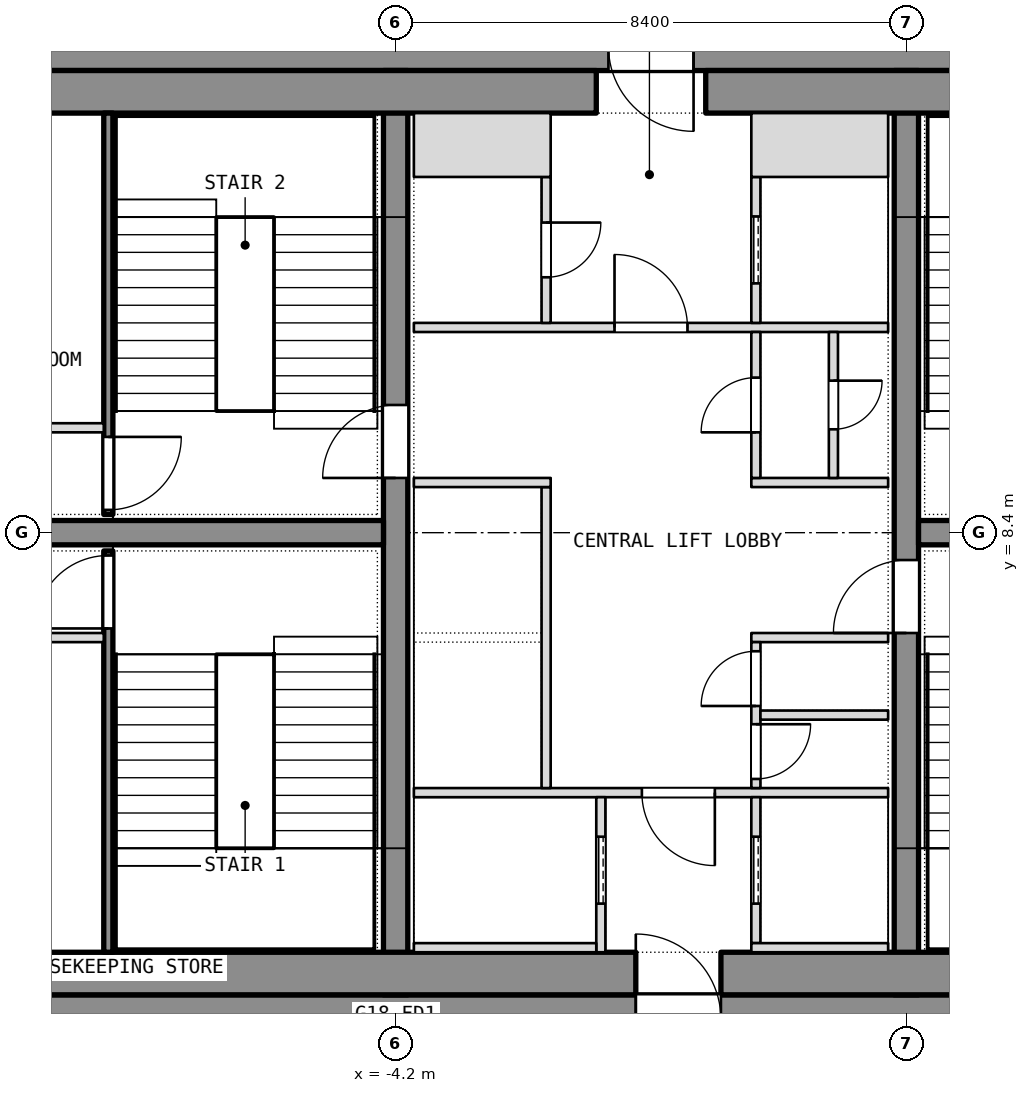
"""IFC4 building model, lengths in metres.
Left out: names, types, materials, properties, quantities, classifications, styles, units other than length and angle.
Written with IfcOpenShell. Run it as: python <this file> out.ifc"""

import sys

from ifc_helpers import new_model, si_unit, direction, frame, frame_2d, origin, place, context, subcontext, project, spatial, rectangle, extrude, element, fill, save


model = new_model("IFC4")
c1 = context("Model", 3, precision=1e-05, world=origin(), true_north=direction((0.0, 1.0)))
c2 = subcontext(c1, "Body", "Model", "MODEL_VIEW")
j1 = project(units=[si_unit("LENGTHUNIT", "METRE"), si_unit("PLANEANGLEUNIT", "RADIAN")], contexts=[c1])
p1 = place(None, origin())
s1 = spatial("IfcSite", under=j1, at=p1, CompositionType="ELEMENT")
p2 = place(p1, origin())
s2 = spatial("IfcBuilding", under=s1, at=p2, CompositionType="ELEMENT")
p3 = place(p2, frame((0.0, 0.0, 216.5)))
s3 = spatial("IfcBuildingStorey", under=s2, at=p3, CompositionType="ELEMENT", Elevation=216.5)
p4 = place(p3, frame((-11.1, 0.4, 0.0), z_axis=(0.0, 0.0, 1.0), x_axis=(1.0, 0.0, 0.0)))
e1 = element("IfcWall", 1, at=p4, inside=s3, PredefinedType="SHEAR", context=c2, shape_type="SweptSolid", body=[
    extrude(rectangle(XDim=22.2, YDim=0.8, at=frame_2d((11.1, 0.0))), origin(), (0.0, 0.0, 1.0), 3.6),
])
p5 = place(p4, frame((10.85, 0.0, 0.0)))
e2 = element("IfcOpeningElement", 2, at=p5, cuts=e1, PredefinedType="OPENING", context=c2, shape_type="SweptSolid", body=[
    extrude(rectangle(XDim=1.4, YDim=2.1, at=frame_2d((0.7, 1.05))), frame((0.0, 0.4, 0.0), z_axis=(0.0, -1.0, 0.0), x_axis=(1.0, 0.0, 0.0)), (0.0, 0.0, 1.0), 0.8),
])
p6 = place(p3, frame((-11.1, 16.4, 0.0), z_axis=(0.0, 0.0, 1.0), x_axis=(1.0, 0.0, 0.0)))
e3 = element("IfcWall", 3, at=p6, inside=s3, PredefinedType="SHEAR", context=c2, shape_type="SweptSolid", body=[
    extrude(rectangle(XDim=22.2, YDim=0.8, at=frame_2d((11.1, 0.0))), origin(), (0.0, 0.0, 1.0), 3.6),
])
p7 = place(p6, frame((10.4, 0.0, 0.0)))
e4 = element("IfcOpeningElement", 4, at=p7, cuts=e3, PredefinedType="OPENING", context=c2, shape_type="SweptSolid", body=[
    extrude(rectangle(XDim=1.4, YDim=2.1, at=frame_2d((0.7, 1.05))), frame((0.0, 0.4, 0.0), z_axis=(0.0, -1.0, 0.0), x_axis=(1.0, 0.0, 0.0)), (0.0, 0.0, 1.0), 0.8),
])
p8 = place(p3, frame((-4.2, 0.8, 0.0), z_axis=(0.0, 0.0, 1.0), x_axis=(0.0, 1.0, 0.0)))
e5 = element("IfcWall", 5, at=p8, inside=s3, PredefinedType="SHEAR", context=c2, shape_type="SweptSolid", body=[
    extrude(rectangle(XDim=15.2, YDim=0.4, at=frame_2d((7.6, 0.0))), origin(), (0.0, 0.0, 1.0), 3.6),
])
p9 = place(p8, frame((8.5, 0.0, 0.0)))
e6 = element("IfcOpeningElement", 6, at=p9, cuts=e5, PredefinedType="OPENING", context=c2, shape_type="SweptSolid", body=[
    extrude(rectangle(XDim=1.2, YDim=2.1, at=frame_2d((0.6, 1.05))), frame((0.0, 0.2, 0.0), z_axis=(0.0, -1.0, 0.0), x_axis=(1.0, 0.0, 0.0)), (0.0, 0.0, 1.0), 0.4),
])
p10 = place(p3, frame((4.2, 0.8, 0.0), z_axis=(0.0, 0.0, 1.0), x_axis=(0.0, 1.0, 0.0)))
e7 = element("IfcWall", 7, at=p10, inside=s3, PredefinedType="SHEAR", context=c2, shape_type="SweptSolid", body=[
    extrude(rectangle(XDim=15.2, YDim=0.4, at=frame_2d((7.6, 0.0))), origin(), (0.0, 0.0, 1.0), 3.6),
])
p11 = place(p10, frame((5.95, 0.0, 0.0)))
e8 = element("IfcOpeningElement", 8, at=p11, cuts=e7, PredefinedType="OPENING", context=c2, shape_type="SweptSolid", body=[
    extrude(rectangle(XDim=1.2, YDim=2.1, at=frame_2d((0.6, 1.05))), frame((0.0, 0.2, 0.0), z_axis=(0.0, -1.0, 0.0), x_axis=(1.0, 0.0, 0.0)), (0.0, 0.0, 1.0), 0.4),
])
for number, where, z_axis, x_axis in (
    (9, (-11.1, 8.4, 0.0), (0.0, 0.0, 1.0), (1.0, 0.0, 0.0)),
    (10, (4.4, 8.4, 0.0), (0.0, 0.0, 1.0), (1.0, 0.0, 0.0)),
):
    element("IfcWall", number, at=place(p3, frame(where, z_axis=z_axis, x_axis=x_axis)), inside=s3, PredefinedType="SHEAR", context=c2, shape_type="SweptSolid", body=[
        extrude(rectangle(XDim=6.7, YDim=0.4, at=frame_2d((3.35, 0.0))), origin(), (0.0, 0.0, 1.0), 3.6),
    ])
p12 = place(p3, frame((-11.1, 1.15, 0.0), z_axis=(0.0, 0.0, 1.0), x_axis=(1.0, 0.0, 0.0)))
e11 = element("IfcWall", 11, at=p12, inside=s3, PredefinedType="PARTITIONING", context=c2, shape_type="SweptSolid", body=[
    extrude(rectangle(XDim=10.85, YDim=0.7, at=frame_2d((5.425, 0.0))), origin(), (0.0, 0.0, 1.0), 3.34),
])
p13 = place(p3, frame((1.15, 1.15, 0.0), z_axis=(0.0, 0.0, 1.0), x_axis=(1.0, 0.0, 0.0)))
e12 = element("IfcWall", 12, at=p13, inside=s3, PredefinedType="PARTITIONING", context=c2, shape_type="SweptSolid", body=[
    extrude(rectangle(XDim=9.95, YDim=0.7, at=frame_2d((4.975, 0.0))), origin(), (0.0, 0.0, 1.0), 3.34),
])
for number, where, z_axis, x_axis in (
    (13, (-11.1, 15.65, 0.0), (0.0, 0.0, 1.0), (1.0, 0.0, 0.0)),
    (14, (0.9, 15.65, 0.0), (0.0, 0.0, 1.0), (1.0, 0.0, 0.0)),
):
    element("IfcWall", number, at=place(p3, frame(where, z_axis=z_axis, x_axis=x_axis)), inside=s3, PredefinedType="PARTITIONING", context=c2, shape_type="SweptSolid", body=[
        extrude(rectangle(XDim=10.2, YDim=0.7, at=frame_2d((5.1, 0.0))), origin(), (0.0, 0.0, 1.0), 3.34),
    ])
p14 = place(p3, frame((-8.925, 1.5, 0.0), z_axis=(0.0, 0.0, 1.0), x_axis=(0.0, 1.0, 0.0)))
e15 = element("IfcWall", 15, at=p14, inside=s3, PredefinedType="SHEAR", context=c2, shape_type="SweptSolid", body=[
    extrude(rectangle(XDim=6.6, YDim=0.15, at=frame_2d((3.3, 0.0))), origin(), (0.0, 0.0, 1.0), 3.34),
])
p15 = place(p14, frame((5.325, 0.0, 0.0)))
e16 = element("IfcOpeningElement", 16, at=p15, cuts=e15, PredefinedType="OPENING", context=c2, shape_type="SweptSolid", body=[
    extrude(rectangle(XDim=1.2, YDim=2.1, at=frame_2d((0.6, 1.05))), frame((0.0, 0.075, 0.0), z_axis=(0.0, -1.0, 0.0), x_axis=(1.0, 0.0, 0.0)), (0.0, 0.0, 1.0), 0.15),
])
p16 = place(p3, frame((-11.1, 6.675, 0.0), z_axis=(0.0, 0.0, 1.0), x_axis=(1.0, 0.0, 0.0)))
e17 = element("IfcWall", 17, at=p16, inside=s3, PredefinedType="PARTITIONING", context=c2, shape_type="SweptSolid", body=[
    extrude(rectangle(XDim=2.1, YDim=0.15, at=frame_2d((1.05, 0.0))), origin(), (0.0, 0.0, 1.0), 3.34),
])
p17 = place(p3, frame((-8.925, 8.7, 0.0), z_axis=(0.0, 0.0, 1.0), x_axis=(0.0, 1.0, 0.0)))
e18 = element("IfcWall", 18, at=p17, inside=s3, PredefinedType="SHEAR", context=c2, shape_type="SweptSolid", body=[
    extrude(rectangle(XDim=6.6, YDim=0.15, at=frame_2d((3.3, 0.0))), origin(), (0.0, 0.0, 1.0), 3.34),
])
p18 = place(p17, frame((0.075, 0.0, 0.0)))
e19 = element("IfcOpeningElement", 19, at=p18, cuts=e18, PredefinedType="OPENING", context=c2, shape_type="SweptSolid", body=[
    extrude(rectangle(XDim=1.2, YDim=2.1, at=frame_2d((0.6, 1.05))), frame((0.0, 0.075, 0.0), z_axis=(0.0, -1.0, 0.0), x_axis=(1.0, 0.0, 0.0)), (0.0, 0.0, 1.0), 0.15),
])
p19 = place(p3, frame((-11.1, 10.125, 0.0), z_axis=(0.0, 0.0, 1.0), x_axis=(1.0, 0.0, 0.0)))
e20 = element("IfcWall", 20, at=p19, inside=s3, PredefinedType="PARTITIONING", context=c2, shape_type="SweptSolid", body=[
    extrude(rectangle(XDim=2.1, YDim=0.15, at=frame_2d((1.05, 0.0))), origin(), (0.0, 0.0, 1.0), 3.34),
])
p20 = place(p3, frame((-3.9, 4.125, 0.0), z_axis=(0.0, 0.0, 1.0), x_axis=(1.0, 0.0, 0.0)))
e21 = element("IfcWall", 21, at=p20, inside=s3, PredefinedType="PARTITIONING", context=c2, shape_type="SweptSolid", body=[
    extrude(rectangle(XDim=7.8, YDim=0.15, at=frame_2d((3.9, 0.0))), origin(), (0.0, 0.0, 1.0), 3.34),
])
p21 = place(p20, frame((3.75, 0.0, 0.0)))
e22 = element("IfcOpeningElement", 22, at=p21, cuts=e21, PredefinedType="OPENING", context=c2, shape_type="SweptSolid", body=[
    extrude(rectangle(XDim=1.2, YDim=2.1, at=frame_2d((0.6, 1.05))), frame((0.0, 0.075, 0.0), z_axis=(0.0, -1.0, 0.0), x_axis=(1.0, 0.0, 0.0)), (0.0, 0.0, 1.0), 0.15),
])
p22 = place(p3, frame((-3.9, 11.775, 0.0), z_axis=(0.0, 0.0, 1.0), x_axis=(1.0, 0.0, 0.0)))
e23 = element("IfcWall", 23, at=p22, inside=s3, PredefinedType="PARTITIONING", context=c2, shape_type="SweptSolid", body=[
    extrude(rectangle(XDim=7.8, YDim=0.15, at=frame_2d((3.9, 0.0))), origin(), (0.0, 0.0, 1.0), 3.34),
])
p23 = place(p22, frame((3.3, 0.0, 0.0)))
e24 = element("IfcOpeningElement", 24, at=p23, cuts=e23, PredefinedType="OPENING", context=c2, shape_type="SweptSolid", body=[
    extrude(rectangle(XDim=1.2, YDim=2.1, at=frame_2d((0.6, 1.05))), frame((0.0, 0.075, 0.0), z_axis=(0.0, -1.0, 0.0), x_axis=(1.0, 0.0, 0.0)), (0.0, 0.0, 1.0), 0.15),
])
p24 = place(p3, frame((-0.825, 1.5, 0.0), z_axis=(0.0, 0.0, 1.0), x_axis=(0.0, 1.0, 0.0)))
e25 = element("IfcWall", 25, at=p24, inside=s3, PredefinedType="SHEAR", context=c2, shape_type="SweptSolid", body=[
    extrude(rectangle(XDim=2.55, YDim=0.15, at=frame_2d((1.275, 0.0))), origin(), (0.0, 0.0, 1.0), 3.6),
])
p25 = place(p24, frame((0.8, 0.0, 0.0)))
e26 = element("IfcOpeningElement", 26, at=p25, cuts=e25, PredefinedType="OPENING", context=c2, shape_type="SweptSolid", body=[
    extrude(rectangle(XDim=1.1, YDim=2.1, at=frame_2d((0.55, 1.05))), frame((0.0, 0.075, 0.0), z_axis=(0.0, -1.0, 0.0), x_axis=(1.0, 0.0, 0.0)), (0.0, 0.0, 1.0), 0.15),
])
p26 = place(p3, frame((-3.9, 1.575, 0.0), z_axis=(0.0, 0.0, 1.0), x_axis=(1.0, 0.0, 0.0)))
e27 = element("IfcWall", 27, at=p26, inside=s3, PredefinedType="SHEAR", context=c2, shape_type="SweptSolid", body=[
    extrude(rectangle(XDim=3.0, YDim=0.15, at=frame_2d((1.5, 0.0))), origin(), (0.0, 0.0, 1.0), 3.6),
])
p27 = place(p3, frame((-1.725, 4.2, 0.0), z_axis=(0.0, 0.0, 1.0), x_axis=(0.0, 1.0, 0.0)))
e28 = element("IfcWall", 28, at=p27, inside=s3, PredefinedType="SHEAR", context=c2, shape_type="SweptSolid", body=[
    extrude(rectangle(XDim=4.95, YDim=0.15, at=frame_2d((2.475, 0.0))), origin(), (0.0, 0.0, 1.0), 3.6),
])
p28 = place(p3, frame((-3.9, 9.225, 0.0), z_axis=(0.0, 0.0, 1.0), x_axis=(1.0, 0.0, 0.0)))
e29 = element("IfcWall", 29, at=p28, inside=s3, PredefinedType="SHEAR", context=c2, shape_type="SweptSolid", body=[
    extrude(rectangle(XDim=2.25, YDim=0.15, at=frame_2d((1.125, 0.0))), origin(), (0.0, 0.0, 1.0), 3.6),
])
p29 = place(p3, frame((-1.725, 11.85, 0.0), z_axis=(0.0, 0.0, 1.0), x_axis=(0.0, 1.0, 0.0)))
e30 = element("IfcWall", 30, at=p29, inside=s3, PredefinedType="PARTITIONING", context=c2, shape_type="SweptSolid", body=[
    extrude(rectangle(XDim=2.4, YDim=0.15, at=frame_2d((1.2, 0.0))), origin(), (0.0, 0.0, 1.0), 3.34),
])
p30 = place(p29, frame((0.75, 0.0, 0.0)))
e31 = element("IfcOpeningElement", 31, at=p30, cuts=e30, PredefinedType="OPENING", context=c2, shape_type="SweptSolid", body=[
    extrude(rectangle(XDim=0.9, YDim=2.1, at=frame_2d((0.45, 1.05))), frame((0.0, 0.075, 0.0), z_axis=(0.0, -1.0, 0.0), x_axis=(1.0, 0.0, 0.0)), (0.0, 0.0, 1.0), 0.15),
])
p31 = place(p3, frame((-3.9, 14.775, 0.0), z_axis=(0.0, 0.0, 1.0), x_axis=(1.0, 0.0, 0.0)))
e32 = element("IfcWall", 32, at=p31, inside=s3, PredefinedType="PARTITIONING", context=c2, shape_type="SweptSolid", body=[
    extrude(rectangle(XDim=2.25, YDim=1.05, at=frame_2d((1.125, 0.0))), origin(), (0.0, 0.0, 1.0), 3.34),
])
p32 = place(p3, frame((1.725, 1.65, 0.0), z_axis=(0.0, 0.0, 1.0), x_axis=(0.0, 1.0, 0.0)))
e33 = element("IfcWall", 33, at=p32, inside=s3, PredefinedType="SHEAR", context=c2, shape_type="SweptSolid", body=[
    extrude(rectangle(XDim=2.4, YDim=0.15, at=frame_2d((1.2, 0.0))), origin(), (0.0, 0.0, 1.0), 3.6),
])
p33 = place(p32, frame((0.65, 0.0, 0.0)))
e34 = element("IfcOpeningElement", 34, at=p33, cuts=e33, PredefinedType="OPENING", context=c2, shape_type="SweptSolid", body=[
    extrude(rectangle(XDim=1.1, YDim=2.1, at=frame_2d((0.55, 1.05))), frame((0.0, 0.075, 0.0), z_axis=(0.0, -1.0, 0.0), x_axis=(1.0, 0.0, 0.0)), (0.0, 0.0, 1.0), 0.15),
])
p34 = place(p3, frame((1.65, 1.575, 0.0), z_axis=(0.0, 0.0, 1.0), x_axis=(1.0, 0.0, 0.0)))
e35 = element("IfcWall", 35, at=p34, inside=s3, PredefinedType="SHEAR", context=c2, shape_type="SweptSolid", body=[
    extrude(rectangle(XDim=2.25, YDim=0.15, at=frame_2d((1.125, 0.0))), origin(), (0.0, 0.0, 1.0), 3.6),
])
p35 = place(p3, frame((1.725, 11.85, 0.0), z_axis=(0.0, 0.0, 1.0), x_axis=(0.0, 1.0, 0.0)))
e36 = element("IfcWall", 36, at=p35, inside=s3, PredefinedType="SHEAR", context=c2, shape_type="SweptSolid", body=[
    extrude(rectangle(XDim=2.4, YDim=0.15, at=frame_2d((1.2, 0.0))), origin(), (0.0, 0.0, 1.0), 3.6),
])
p36 = place(p35, frame((0.65, 0.0, 0.0)))
e37 = element("IfcOpeningElement", 37, at=p36, cuts=e36, PredefinedType="OPENING", context=c2, shape_type="SweptSolid", body=[
    extrude(rectangle(XDim=1.1, YDim=2.1, at=frame_2d((0.55, 1.05))), frame((0.0, 0.075, 0.0), z_axis=(0.0, -1.0, 0.0), x_axis=(1.0, 0.0, 0.0)), (0.0, 0.0, 1.0), 0.15),
])
p37 = place(p3, frame((1.65, 14.775, 0.0), z_axis=(0.0, 0.0, 1.0), x_axis=(1.0, 0.0, 0.0)))
e38 = element("IfcWall", 38, at=p37, inside=s3, PredefinedType="SHEAR", context=c2, shape_type="SweptSolid", body=[
    extrude(rectangle(XDim=2.25, YDim=1.05, at=frame_2d((1.125, 0.0))), origin(), (0.0, 0.0, 1.0), 3.6),
])
for number, where, z_axis, x_axis in (
    (39, (1.65, 6.675, 0.0), (0.0, 0.0, 1.0), (1.0, 0.0, 0.0)),
    (40, (1.65, 9.225, 0.0), (0.0, 0.0, 1.0), (1.0, 0.0, 0.0)),
):
    element("IfcWall", number, at=place(p3, frame(where, z_axis=z_axis, x_axis=x_axis)), inside=s3, PredefinedType="PARTITIONING", context=c2, shape_type="SweptSolid", body=[
        extrude(rectangle(XDim=2.25, YDim=0.15, at=frame_2d((1.125, 0.0))), origin(), (0.0, 0.0, 1.0), 3.34),
    ])
p38 = place(p3, frame((1.725, 4.2, 0.0), z_axis=(0.0, 0.0, 1.0), x_axis=(0.0, 1.0, 0.0)))
e41 = element("IfcWall", 41, at=p38, inside=s3, PredefinedType="PARTITIONING", context=c2, shape_type="SweptSolid", body=[
    extrude(rectangle(XDim=2.4, YDim=0.15, at=frame_2d((1.2, 0.0))), origin(), (0.0, 0.0, 1.0), 3.34),
])
p39 = place(p38, frame((0.15, 0.0, 0.0)))
e42 = element("IfcOpeningElement", 42, at=p39, cuts=e41, PredefinedType="OPENING", context=c2, shape_type="SweptSolid", body=[
    extrude(rectangle(XDim=0.9, YDim=2.1, at=frame_2d((0.45, 1.05))), frame((0.0, 0.075, 0.0), z_axis=(0.0, -1.0, 0.0), x_axis=(1.0, 0.0, 0.0)), (0.0, 0.0, 1.0), 0.15),
])
p40 = place(p38, frame((1.35, 0.0, 0.0)))
e43 = element("IfcOpeningElement", 43, at=p40, cuts=e41, PredefinedType="OPENING", context=c2, shape_type="SweptSolid", body=[
    extrude(rectangle(XDim=0.9, YDim=2.1, at=frame_2d((0.45, 1.05))), frame((0.0, 0.075, 0.0), z_axis=(0.0, -1.0, 0.0), x_axis=(1.0, 0.0, 0.0)), (0.0, 0.0, 1.0), 0.15),
])
p41 = place(p3, frame((1.725, 9.3, 0.0), z_axis=(0.0, 0.0, 1.0), x_axis=(0.0, 1.0, 0.0)))
e44 = element("IfcWall", 44, at=p41, inside=s3, PredefinedType="PARTITIONING", context=c2, shape_type="SweptSolid", body=[
    extrude(rectangle(XDim=2.4, YDim=0.15, at=frame_2d((1.2, 0.0))), origin(), (0.0, 0.0, 1.0), 3.34),
])
p42 = place(p41, frame((0.75, 0.0, 0.0)))
e45 = element("IfcOpeningElement", 45, at=p42, cuts=e44, PredefinedType="OPENING", context=c2, shape_type="SweptSolid", body=[
    extrude(rectangle(XDim=0.9, YDim=2.1, at=frame_2d((0.45, 1.05))), frame((0.0, 0.075, 0.0), z_axis=(0.0, -1.0, 0.0), x_axis=(1.0, 0.0, 0.0)), (0.0, 0.0, 1.0), 0.15),
])
p43 = place(p3, frame((1.8, 5.4, 0.0), z_axis=(0.0, 0.0, 1.0), x_axis=(1.0, 0.0, 0.0)))
e46 = element("IfcWall", 46, at=p43, inside=s3, PredefinedType="PARTITIONING", context=c2, shape_type="SweptSolid", body=[
    extrude(rectangle(XDim=2.1, YDim=0.15, at=frame_2d((1.05, 0.0))), origin(), (0.0, 0.0, 1.0), 3.34),
])
p44 = place(p3, frame((3.0, 9.3, 0.0), z_axis=(0.0, 0.0, 1.0), x_axis=(0.0, 1.0, 0.0)))
e47 = element("IfcWall", 47, at=p44, inside=s3, PredefinedType="PARTITIONING", context=c2, shape_type="SweptSolid", body=[
    extrude(rectangle(XDim=2.4, YDim=0.15, at=frame_2d((1.2, 0.0))), origin(), (0.0, 0.0, 1.0), 3.34),
])
p45 = place(p44, frame((0.8, 0.0, 0.0)))
e48 = element("IfcOpeningElement", 48, at=p45, cuts=e47, PredefinedType="OPENING", context=c2, shape_type="SweptSolid", body=[
    extrude(rectangle(XDim=0.8, YDim=2.1, at=frame_2d((0.4, 1.05))), frame((0.0, 0.075, 0.0), z_axis=(0.0, -1.0, 0.0), x_axis=(1.0, 0.0, 0.0)), (0.0, 0.0, 1.0), 0.15),
])
p46 = place(p15, origin())
e49 = element("IfcDoor", 49, at=p46, inside=s3, OperationType="SINGLE_SWING_LEFT", PredefinedType="DOOR", context=c2, shape_type="SweptSolid", body=[
    extrude(rectangle(XDim=1.2, YDim=2.1, at=frame_2d((0.6, 1.05))), frame((0.0, 0.025, 0.0), z_axis=(0.0, -1.0, 0.0), x_axis=(1.0, 0.0, 0.0)), (0.0, 0.0, 1.0), 0.05),
])
fill(e16, e49)
p47 = place(p18, origin())
e50 = element("IfcDoor", 50, at=p47, inside=s3, OperationType="SINGLE_SWING_LEFT", PredefinedType="DOOR", context=c2, shape_type="SweptSolid", body=[
    extrude(rectangle(XDim=1.2, YDim=2.1, at=frame_2d((0.6, 1.05))), frame((0.0, 0.025, 0.0), z_axis=(0.0, -1.0, 0.0), x_axis=(1.0, 0.0, 0.0)), (0.0, 0.0, 1.0), 0.05),
])
fill(e19, e50)
p48 = place(p39, origin())
e51 = element("IfcDoor", 51, at=p48, inside=s3, OperationType="SINGLE_SWING_LEFT", PredefinedType="DOOR", context=c2, shape_type="SweptSolid", body=[
    extrude(rectangle(XDim=0.9, YDim=2.1, at=frame_2d((0.45, 1.05))), frame((0.0, 0.025, 0.0), z_axis=(0.0, -1.0, 0.0), x_axis=(1.0, 0.0, 0.0)), (0.0, 0.0, 1.0), 0.05),
])
fill(e42, e51)
p49 = place(p40, origin())
e52 = element("IfcDoor", 52, at=p49, inside=s3, OperationType="SINGLE_SWING_LEFT", PredefinedType="DOOR", context=c2, shape_type="SweptSolid", body=[
    extrude(rectangle(XDim=0.9, YDim=2.1, at=frame_2d((0.45, 1.05))), frame((0.0, 0.025, 0.0), z_axis=(0.0, -1.0, 0.0), x_axis=(1.0, 0.0, 0.0)), (0.0, 0.0, 1.0), 0.05),
])
fill(e43, e52)
p50 = place(p42, origin())
e53 = element("IfcDoor", 53, at=p50, inside=s3, OperationType="SINGLE_SWING_LEFT", PredefinedType="DOOR", context=c2, shape_type="SweptSolid", body=[
    extrude(rectangle(XDim=0.9, YDim=2.1, at=frame_2d((0.45, 1.05))), frame((0.0, 0.025, 0.0), z_axis=(0.0, -1.0, 0.0), x_axis=(1.0, 0.0, 0.0)), (0.0, 0.0, 1.0), 0.05),
])
fill(e45, e53)
p51 = place(p45, origin())
e54 = element("IfcDoor", 54, at=p51, inside=s3, OperationType="SINGLE_SWING_LEFT", PredefinedType="DOOR", context=c2, shape_type="SweptSolid", body=[
    extrude(rectangle(XDim=0.8, YDim=2.1, at=frame_2d((0.4, 1.05))), frame((0.0, 0.025, 0.0), z_axis=(0.0, -1.0, 0.0), x_axis=(1.0, 0.0, 0.0)), (0.0, 0.0, 1.0), 0.05),
])
fill(e48, e54)
p52 = place(p25, origin())
e55 = element("IfcDoor", 55, at=p52, inside=s3, OperationType="SLIDING_TO_LEFT", PredefinedType="DOOR", context=c2, shape_type="SweptSolid", body=[
    extrude(rectangle(XDim=1.1, YDim=2.1, at=frame_2d((0.55, 1.05))), frame((0.0, 0.025, 0.0), z_axis=(0.0, -1.0, 0.0), x_axis=(1.0, 0.0, 0.0)), (0.0, 0.0, 1.0), 0.05),
])
fill(e26, e55)
p53 = place(p33, origin())
e56 = element("IfcDoor", 56, at=p53, inside=s3, OperationType="SLIDING_TO_LEFT", PredefinedType="DOOR", context=c2, shape_type="SweptSolid", body=[
    extrude(rectangle(XDim=1.1, YDim=2.1, at=frame_2d((0.55, 1.05))), frame((0.0, 0.025, 0.0), z_axis=(0.0, -1.0, 0.0), x_axis=(1.0, 0.0, 0.0)), (0.0, 0.0, 1.0), 0.05),
])
fill(e34, e56)
p54 = place(p36, origin())
e57 = element("IfcDoor", 57, at=p54, inside=s3, OperationType="SLIDING_TO_LEFT", PredefinedType="DOOR", context=c2, shape_type="SweptSolid", body=[
    extrude(rectangle(XDim=1.1, YDim=2.1, at=frame_2d((0.55, 1.05))), frame((0.0, 0.025, 0.0), z_axis=(0.0, -1.0, 0.0), x_axis=(1.0, 0.0, 0.0)), (0.0, 0.0, 1.0), 0.05),
])
fill(e37, e57)
p55 = place(p21, origin())
e58 = element("IfcDoor", 58, at=p55, inside=s3, OperationType="SINGLE_SWING_LEFT", PredefinedType="DOOR", context=c2, shape_type="SweptSolid", body=[
    extrude(rectangle(XDim=1.2, YDim=2.1, at=frame_2d((0.6, 1.05))), frame((0.0, 0.025, 0.0), z_axis=(0.0, -1.0, 0.0), x_axis=(1.0, 0.0, 0.0)), (0.0, 0.0, 1.0), 0.05),
])
fill(e22, e58)
p56 = place(p23, origin())
e59 = element("IfcDoor", 59, at=p56, inside=s3, OperationType="SINGLE_SWING_LEFT", PredefinedType="DOOR", context=c2, shape_type="SweptSolid", body=[
    extrude(rectangle(XDim=1.2, YDim=2.1, at=frame_2d((0.6, 1.05))), frame((0.0, 0.025, 0.0), z_axis=(0.0, -1.0, 0.0), x_axis=(1.0, 0.0, 0.0)), (0.0, 0.0, 1.0), 0.05),
])
fill(e24, e59)
p57 = place(p30, origin())
e60 = element("IfcDoor", 60, at=p57, inside=s3, OperationType="SINGLE_SWING_LEFT", PredefinedType="DOOR", context=c2, shape_type="SweptSolid", body=[
    extrude(rectangle(XDim=0.9, YDim=2.1, at=frame_2d((0.45, 1.05))), frame((0.0, 0.025, 0.0), z_axis=(0.0, -1.0, 0.0), x_axis=(1.0, 0.0, 0.0)), (0.0, 0.0, 1.0), 0.05),
])
fill(e31, e60)
p58 = place(p9, origin())
e61 = element("IfcDoor", 61, at=p58, inside=s3, OperationType="SINGLE_SWING_LEFT", PredefinedType="DOOR", context=c2, shape_type="SweptSolid", body=[
    extrude(rectangle(XDim=1.2, YDim=2.1, at=frame_2d((0.6, 1.05))), frame((0.0, 0.025, 0.0), z_axis=(0.0, -1.0, 0.0), x_axis=(1.0, 0.0, 0.0)), (0.0, 0.0, 1.0), 0.05),
])
fill(e6, e61)
p59 = place(p11, origin())
e62 = element("IfcDoor", 62, at=p59, inside=s3, OperationType="SINGLE_SWING_LEFT", PredefinedType="DOOR", context=c2, shape_type="SweptSolid", body=[
    extrude(rectangle(XDim=1.2, YDim=2.1, at=frame_2d((0.6, 1.05))), frame((0.0, 0.025, 0.0), z_axis=(0.0, -1.0, 0.0), x_axis=(1.0, 0.0, 0.0)), (0.0, 0.0, 1.0), 0.05),
])
fill(e8, e62)
save(model, sys.argv[1])
